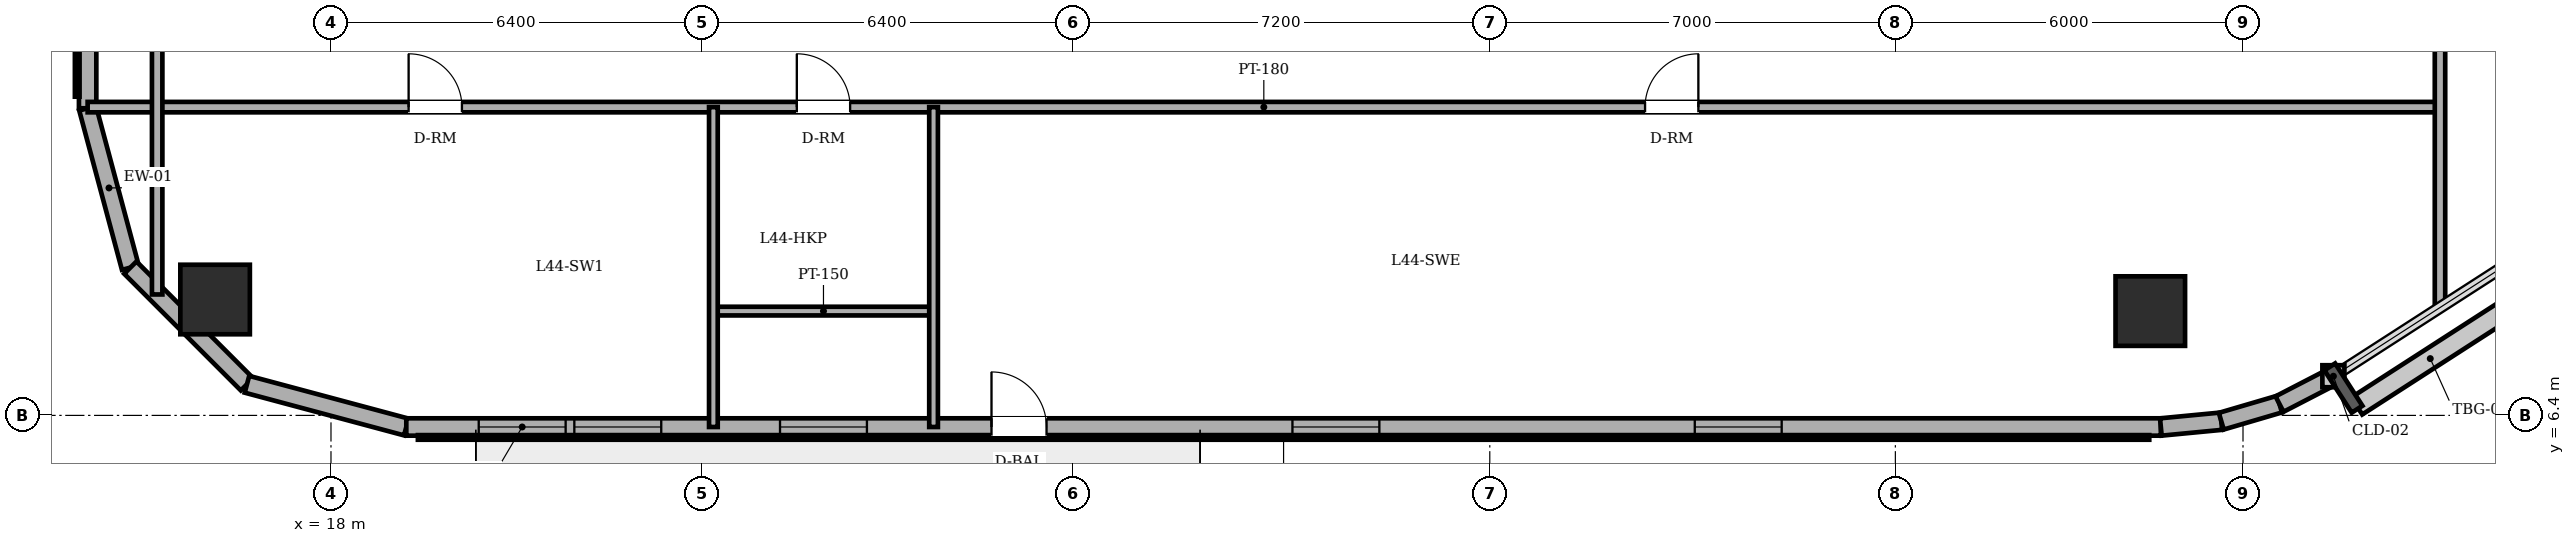
"""IFC4 building model, lengths in metres.
Left out: names, types, materials, properties, quantities, classifications, styles, units other than length and angle.
Written with IfcOpenShell. Run it as: python <this file> out.ifc"""

import sys

from ifc_helpers import new_model, si_unit, direction, frame, frame_2d, origin, origin_2d, place, context, subcontext, project, spatial, rectangle, circle, extrude, element, fill, save


model = new_model("IFC4")
c1 = context("Model", 3, precision=1e-05, world=origin(), true_north=direction((0.0, 1.0)))
c2 = subcontext(c1, "Body", "Model", "MODEL_VIEW")
j1 = project(units=[si_unit("LENGTHUNIT", "METRE"), si_unit("PLANEANGLEUNIT", "RADIAN")], contexts=[c1])
p1 = place(None, origin())
s1 = spatial("IfcSite", under=j1, at=p1, CompositionType="ELEMENT")
p2 = place(p1, origin())
s2 = spatial("IfcBuilding", under=s1, at=p2, CompositionType="ELEMENT")
p3 = place(p2, frame((0.0, 0.0, 169.0)))
s3 = spatial("IfcBuildingStorey", under=s2, at=p3, CompositionType="ELEMENT", Elevation=169.0)
for number, where, z_axis, x_axis in (
    (1, (16.0, 8.4, 0.0), (0.0, 0.0, 1.0), (1.0, 0.0, 0.0)),
    (2, (49.4, 8.2, 0.0), (0.0, 0.0, 1.0), (1.0, 0.0, 0.0)),
):
    element("IfcColumn", number, at=place(p3, frame(where, z_axis=z_axis, x_axis=x_axis)), inside=s3, PredefinedType="COLUMN", context=c2, shape_type="SweptSolid", body=[
        extrude(circle(Radius=0.6, at=origin_2d()), origin(), (0.0, 0.0, 1.0), 3.6),
    ])
p4 = place(p3, frame((13.8, 11.7, 0.0), z_axis=(0.0, 0.0, 1.0), x_axis=(0.258884674387, -0.965908238586, 0.0)))
e3 = element("IfcWall", 3, at=p4, inside=s3, PredefinedType="SOLIDWALL", context=c2, shape_type="SweptSolid", body=[
    extrude(rectangle(XDim=2.847, YDim=0.3, at=frame_2d((1.424, 0.0))), origin(), (0.0, 0.0, 1.0), 3.4),
])
p5 = place(p3, frame((14.537, 8.95, 0.0), z_axis=(0.0, 0.0, 1.0), x_axis=(0.707106781187, -0.707106781187, 0.0)))
e4 = element("IfcWall", 4, at=p5, inside=s3, PredefinedType="SOLIDWALL", context=c2, shape_type="SweptSolid", body=[
    extrude(rectangle(XDim=2.847, YDim=0.3, at=frame_2d((1.423, 0.0))), origin(), (0.0, 0.0, 1.0), 3.4),
])
p6 = place(p3, frame((16.55, 6.937, 0.0), z_axis=(0.0, 0.0, 1.0), x_axis=(0.965908238586, -0.258884674387, 0.0)))
e5 = element("IfcWall", 5, at=p6, inside=s3, PredefinedType="SOLIDWALL", context=c2, shape_type="SweptSolid", body=[
    extrude(rectangle(XDim=2.847, YDim=0.3, at=frame_2d((1.424, 0.0))), origin(), (0.0, 0.0, 1.0), 3.4),
])
p7 = place(p3, frame((19.3, 6.2, 0.0), z_axis=(0.0, 0.0, 1.0), x_axis=(1.0, 0.0, 0.0)))
e6 = element("IfcWall", 6, at=p7, inside=s3, PredefinedType="SOLIDWALL", context=c2, shape_type="SweptSolid", body=[
    extrude(rectangle(XDim=30.282, YDim=0.3, at=frame_2d((15.141, 0.0))), origin(), (0.0, 0.0, 1.0), 3.4),
])
p8 = place(p7, frame((10.1, 0.0, 0.0)))
e7 = element("IfcOpeningElement", 7, at=p8, cuts=e6, PredefinedType="OPENING", context=c2, shape_type="SweptSolid", body=[
    extrude(rectangle(XDim=0.95, YDim=2.2, at=frame_2d((0.475, 1.1))), frame((0.0, 0.16, 0.0), z_axis=(0.0, -1.0, 0.0), x_axis=(1.0, 0.0, 0.0)), (0.0, 0.0, 1.0), 0.32),
])
p9 = place(p7, frame((1.25, 0.0, 0.85)))
e8 = element("IfcOpeningElement", 8, at=p9, cuts=e6, PredefinedType="OPENING", context=c2, shape_type="SweptSolid", body=[
    extrude(rectangle(XDim=1.5, YDim=1.55, at=frame_2d((0.75, 0.775))), frame((0.0, 0.16, 0.0), z_axis=(0.0, -1.0, 0.0), x_axis=(1.0, 0.0, 0.0)), (0.0, 0.0, 1.0), 0.32),
])
p10 = place(p7, frame((2.9, 0.0, 0.85)))
e9 = element("IfcOpeningElement", 9, at=p10, cuts=e6, PredefinedType="OPENING", context=c2, shape_type="SweptSolid", body=[
    extrude(rectangle(XDim=1.5, YDim=1.55, at=frame_2d((0.75, 0.775))), frame((0.0, 0.16, 0.0), z_axis=(0.0, -1.0, 0.0), x_axis=(1.0, 0.0, 0.0)), (0.0, 0.0, 1.0), 0.32),
])
p11 = place(p7, frame((6.45, 0.0, 0.85)))
e10 = element("IfcOpeningElement", 10, at=p11, cuts=e6, PredefinedType="OPENING", context=c2, shape_type="SweptSolid", body=[
    extrude(rectangle(XDim=1.5, YDim=1.55, at=frame_2d((0.75, 0.775))), frame((0.0, 0.16, 0.0), z_axis=(0.0, -1.0, 0.0), x_axis=(1.0, 0.0, 0.0)), (0.0, 0.0, 1.0), 0.32),
])
p12 = place(p7, frame((15.294, 0.0, 0.85)))
e11 = element("IfcOpeningElement", 11, at=p12, cuts=e6, PredefinedType="OPENING", context=c2, shape_type="SweptSolid", body=[
    extrude(rectangle(XDim=1.5, YDim=1.55, at=frame_2d((0.75, 0.775))), frame((0.0, 0.16, 0.0), z_axis=(0.0, -1.0, 0.0), x_axis=(1.0, 0.0, 0.0)), (0.0, 0.0, 1.0), 0.32),
])
p13 = place(p7, frame((22.238, 0.0, 0.85)))
e12 = element("IfcOpeningElement", 12, at=p13, cuts=e6, PredefinedType="OPENING", context=c2, shape_type="SweptSolid", body=[
    extrude(rectangle(XDim=1.5, YDim=1.55, at=frame_2d((0.75, 0.775))), frame((0.0, 0.16, 0.0), z_axis=(0.0, -1.0, 0.0), x_axis=(1.0, 0.0, 0.0)), (0.0, 0.0, 1.0), 0.32),
])
p14 = place(p3, frame((49.582, 6.2, 0.0), z_axis=(0.0, 0.0, 1.0), x_axis=(0.995426089968, 0.095534807324, 0.0)))
e13 = element("IfcWall", 13, at=p14, inside=s3, PredefinedType="SOLIDWALL", context=c2, shape_type="SweptSolid", body=[
    extrude(rectangle(XDim=1.048, YDim=0.3, at=frame_2d((0.524, 0.0))), origin(), (0.0, 0.0, 1.0), 3.4),
])
p15 = place(p3, frame((50.625, 6.3, 0.0), z_axis=(0.0, 0.0, 1.0), x_axis=(0.959528674476, 0.281610942363, 0.0)))
e14 = element("IfcWall", 14, at=p15, inside=s3, PredefinedType="SOLIDWALL", context=c2, shape_type="SweptSolid", body=[
    extrude(rectangle(XDim=1.047, YDim=0.3, at=frame_2d((0.524, 0.0))), origin(), (0.0, 0.0, 1.0), 3.4),
])
p16 = place(p3, frame((51.63, 6.595, 0.0), z_axis=(0.0, 0.0, 1.0), x_axis=(0.888283247196, 0.459296062198, 0.0)))
e15 = element("IfcWall", 15, at=p16, inside=s3, PredefinedType="SOLIDWALL", context=c2, shape_type="SweptSolid", body=[
    extrude(rectangle(XDim=1.047, YDim=0.3, at=frame_2d((0.523, 0.0))), origin(), (0.0, 0.0, 1.0), 3.4),
])
p17 = place(p3, frame((13.8, 36.3, 0.0), z_axis=(0.0, 0.0, 1.0), x_axis=(0.0, -1.0, 0.0)))
e16 = element("IfcWall", 16, at=p17, inside=s3, PredefinedType="SOLIDWALL", context=c2, shape_type="SweptSolid", body=[
    extrude(rectangle(XDim=24.6, YDim=0.3, at=frame_2d((12.3, 0.0))), origin(), (0.0, 0.0, 1.0), 3.4),
])
p18 = place(p17, frame((5.003, 0.0, 0.85)))
e17 = element("IfcOpeningElement", 17, at=p18, cuts=e16, PredefinedType="OPENING", context=c2, shape_type="SweptSolid", body=[
    extrude(rectangle(XDim=1.5, YDim=1.55, at=frame_2d((0.75, 0.775))), frame((0.0, 0.16, 0.0), z_axis=(0.0, -1.0, 0.0), x_axis=(1.0, 0.0, 0.0)), (0.0, 0.0, 1.0), 0.32),
])
p19 = place(p17, frame((8.277, 0.0, 0.85)))
e18 = element("IfcOpeningElement", 18, at=p19, cuts=e16, PredefinedType="OPENING", context=c2, shape_type="SweptSolid", body=[
    extrude(rectangle(XDim=1.5, YDim=1.55, at=frame_2d((0.75, 0.775))), frame((0.0, 0.16, 0.0), z_axis=(0.0, -1.0, 0.0), x_axis=(1.0, 0.0, 0.0)), (0.0, 0.0, 1.0), 0.32),
])
p20 = place(p17, frame((14.823, 0.0, 0.85)))
e19 = element("IfcOpeningElement", 19, at=p20, cuts=e16, PredefinedType="OPENING", context=c2, shape_type="SweptSolid", body=[
    extrude(rectangle(XDim=1.5, YDim=1.55, at=frame_2d((0.75, 0.775))), frame((0.0, 0.16, 0.0), z_axis=(0.0, -1.0, 0.0), x_axis=(1.0, 0.0, 0.0)), (0.0, 0.0, 1.0), 0.32),
])
p21 = place(p17, frame((18.097, 0.0, 0.85)))
e20 = element("IfcOpeningElement", 20, at=p21, cuts=e16, PredefinedType="OPENING", context=c2, shape_type="SweptSolid", body=[
    extrude(rectangle(XDim=1.5, YDim=1.55, at=frame_2d((0.75, 0.775))), frame((0.0, 0.16, 0.0), z_axis=(0.0, -1.0, 0.0), x_axis=(1.0, 0.0, 0.0)), (0.0, 0.0, 1.0), 0.32),
])
p22 = place(p3, frame((24.6, 8.2, 0.0), z_axis=(0.0, 0.0, 1.0), x_axis=(1.0, 0.0, 0.0)))
e21 = element("IfcWall", 21, at=p22, inside=s3, PredefinedType="PARTITIONING", context=c2, shape_type="SweptSolid", body=[
    extrude(rectangle(XDim=3.8, YDim=0.15, at=frame_2d((1.9, 0.0))), origin(), (0.0, 0.0, 1.0), 2.882),
])
p23 = place(p3, frame((13.8, 11.72, 0.0), z_axis=(0.0, 0.0, 1.0), x_axis=(1.0, 0.0, 0.0)))
e22 = element("IfcWall", 22, at=p23, inside=s3, PredefinedType="PARTITIONING", context=c2, shape_type="SweptSolid", body=[
    extrude(rectangle(XDim=40.6, YDim=0.18, at=frame_2d((20.3, 0.0))), origin(), (0.0, 0.0, 1.0), 3.4),
])
p24 = place(p23, frame((12.24, 0.0, 0.0)))
e23 = element("IfcOpeningElement", 23, at=p24, cuts=e22, PredefinedType="OPENING", context=c2, shape_type="SweptSolid", body=[
    extrude(rectangle(XDim=0.92, YDim=2.1, at=frame_2d((0.46, 1.05))), frame((0.0, 0.1, 0.0), z_axis=(0.0, -1.0, 0.0), x_axis=(1.0, 0.0, 0.0)), (0.0, 0.0, 1.0), 0.2),
])
p25 = place(p23, frame((5.54, 0.0, 0.0)))
e24 = element("IfcOpeningElement", 24, at=p25, cuts=e22, PredefinedType="OPENING", context=c2, shape_type="SweptSolid", body=[
    extrude(rectangle(XDim=0.92, YDim=2.1, at=frame_2d((0.46, 1.05))), frame((0.0, 0.1, 0.0), z_axis=(0.0, -1.0, 0.0), x_axis=(1.0, 0.0, 0.0)), (0.0, 0.0, 1.0), 0.2),
])
p26 = place(p23, frame((26.88, 0.0, 0.0)))
e25 = element("IfcOpeningElement", 25, at=p26, cuts=e22, PredefinedType="OPENING", context=c2, shape_type="SweptSolid", body=[
    extrude(rectangle(XDim=0.92, YDim=2.1, at=frame_2d((0.46, 1.05))), frame((0.0, 0.1, 0.0), z_axis=(0.0, -1.0, 0.0), x_axis=(1.0, 0.0, 0.0)), (0.0, 0.0, 1.0), 0.2),
])
p27 = place(p3, frame((15.0, 8.487, 0.0), z_axis=(0.0, 0.0, 1.0), x_axis=(0.0, 1.0, 0.0)))
e26 = element("IfcWall", 26, at=p27, inside=s3, PredefinedType="PARTITIONING", context=c2, shape_type="SweptSolid", body=[
    extrude(rectangle(XDim=5.693, YDim=0.18, at=frame_2d((2.846, 0.0))), origin(), (0.0, 0.0, 1.0), 3.4),
])
for number, where, z_axis, x_axis in (
    (27, (24.6, 6.2, 0.0), (0.0, 0.0, 1.0), (0.0, 1.0, 0.0)),
    (28, (28.4, 6.2, 0.0), (0.0, 0.0, 1.0), (0.0, 1.0, 0.0)),
):
    element("IfcWall", number, at=place(p3, frame(where, z_axis=z_axis, x_axis=x_axis)), inside=s3, PredefinedType="PARTITIONING", context=c2, shape_type="SweptSolid", body=[
        extrude(rectangle(XDim=5.52, YDim=0.15, at=frame_2d((2.76, 0.0))), origin(), (0.0, 0.0, 1.0), 3.4),
    ])
p28 = place(p3, frame((54.4, 8.261, 0.0), z_axis=(0.0, 0.0, 1.0), x_axis=(0.0, 1.0, 0.0)))
e29 = element("IfcWall", 29, at=p28, inside=s3, PredefinedType="PARTITIONING", context=c2, shape_type="SweptSolid", body=[
    extrude(rectangle(XDim=22.089, YDim=0.18, at=frame_2d((11.044, 0.0))), origin(), (0.0, 0.0, 1.0), 3.4),
])
p29 = place(p28, frame((17.694, 0.0, 0.0)))
e30 = element("IfcOpeningElement", 30, at=p29, cuts=e29, PredefinedType="OPENING", context=c2, shape_type="SweptSolid", body=[
    extrude(rectangle(XDim=0.92, YDim=2.1, at=frame_2d((0.46, 1.05))), frame((0.0, 0.1, 0.0), z_axis=(0.0, -1.0, 0.0), x_axis=(1.0, 0.0, 0.0)), (0.0, 0.0, 1.0), 0.2),
])
p30 = place(p28, frame((10.771, 0.0, 0.0)))
e31 = element("IfcOpeningElement", 31, at=p30, cuts=e29, PredefinedType="OPENING", context=c2, shape_type="SweptSolid", body=[
    extrude(rectangle(XDim=0.92, YDim=2.1, at=frame_2d((0.46, 1.05))), frame((0.0, 0.1, 0.0), z_axis=(0.0, -1.0, 0.0), x_axis=(1.0, 0.0, 0.0)), (0.0, 0.0, 1.0), 0.2),
])
p31 = place(p8, origin())
e32 = element("IfcDoor", 32, at=p31, inside=s3, OperationType="SINGLE_SWING_LEFT", PredefinedType="DOOR", context=c2, shape_type="SweptSolid", body=[
    extrude(rectangle(XDim=0.95, YDim=2.2, at=frame_2d((0.475, 1.1))), frame((0.0, 0.025, 0.0), z_axis=(0.0, -1.0, 0.0), x_axis=(1.0, 0.0, 0.0)), (0.0, 0.0, 1.0), 0.05),
])
fill(e7, e32)
p32 = place(p9, origin())
e33 = element("IfcWindow", 33, at=p32, inside=s3, PartitioningType="DOUBLE_PANEL_VERTICAL", PredefinedType="WINDOW", context=c2, shape_type="SweptSolid", body=[
    extrude(rectangle(XDim=1.5, YDim=1.55, at=frame_2d((0.75, 0.775))), frame((0.0, 0.03, 0.0), z_axis=(0.0, -1.0, 0.0), x_axis=(1.0, 0.0, 0.0)), (0.0, 0.0, 1.0), 0.06),
])
fill(e8, e33)
p33 = place(p10, origin())
e34 = element("IfcWindow", 34, at=p33, inside=s3, PartitioningType="DOUBLE_PANEL_VERTICAL", PredefinedType="WINDOW", context=c2, shape_type="SweptSolid", body=[
    extrude(rectangle(XDim=1.5, YDim=1.55, at=frame_2d((0.75, 0.775))), frame((0.0, 0.03, 0.0), z_axis=(0.0, -1.0, 0.0), x_axis=(1.0, 0.0, 0.0)), (0.0, 0.0, 1.0), 0.06),
])
fill(e9, e34)
p34 = place(p11, origin())
e35 = element("IfcWindow", 35, at=p34, inside=s3, PartitioningType="DOUBLE_PANEL_VERTICAL", PredefinedType="WINDOW", context=c2, shape_type="SweptSolid", body=[
    extrude(rectangle(XDim=1.5, YDim=1.55, at=frame_2d((0.75, 0.775))), frame((0.0, 0.03, 0.0), z_axis=(0.0, -1.0, 0.0), x_axis=(1.0, 0.0, 0.0)), (0.0, 0.0, 1.0), 0.06),
])
fill(e10, e35)
p35 = place(p12, origin())
e36 = element("IfcWindow", 36, at=p35, inside=s3, PartitioningType="DOUBLE_PANEL_VERTICAL", PredefinedType="WINDOW", context=c2, shape_type="SweptSolid", body=[
    extrude(rectangle(XDim=1.5, YDim=1.55, at=frame_2d((0.75, 0.775))), frame((0.0, 0.03, 0.0), z_axis=(0.0, -1.0, 0.0), x_axis=(1.0, 0.0, 0.0)), (0.0, 0.0, 1.0), 0.06),
])
fill(e11, e36)
p36 = place(p13, origin())
e37 = element("IfcWindow", 37, at=p36, inside=s3, PartitioningType="DOUBLE_PANEL_VERTICAL", PredefinedType="WINDOW", context=c2, shape_type="SweptSolid", body=[
    extrude(rectangle(XDim=1.5, YDim=1.55, at=frame_2d((0.75, 0.775))), frame((0.0, 0.03, 0.0), z_axis=(0.0, -1.0, 0.0), x_axis=(1.0, 0.0, 0.0)), (0.0, 0.0, 1.0), 0.06),
])
fill(e12, e37)
p37 = place(p24, origin())
e38 = element("IfcDoor", 38, at=p37, inside=s3, OperationType="SINGLE_SWING_LEFT", PredefinedType="DOOR", context=c2, shape_type="SweptSolid", body=[
    extrude(rectangle(XDim=0.92, YDim=2.1, at=frame_2d((0.46, 1.05))), frame((0.0, 0.025, 0.0), z_axis=(0.0, -1.0, 0.0), x_axis=(1.0, 0.0, 0.0)), (0.0, 0.0, 1.0), 0.05),
])
fill(e23, e38)
p38 = place(p25, origin())
e39 = element("IfcDoor", 39, at=p38, inside=s3, OperationType="SINGLE_SWING_LEFT", PredefinedType="DOOR", context=c2, shape_type="SweptSolid", body=[
    extrude(rectangle(XDim=0.92, YDim=2.1, at=frame_2d((0.46, 1.05))), frame((0.0, 0.025, 0.0), z_axis=(0.0, -1.0, 0.0), x_axis=(1.0, 0.0, 0.0)), (0.0, 0.0, 1.0), 0.05),
])
fill(e24, e39)
p39 = place(p26, origin())
e40 = element("IfcDoor", 40, at=p39, inside=s3, OperationType="SINGLE_SWING_RIGHT", PredefinedType="DOOR", context=c2, shape_type="SweptSolid", body=[
    extrude(rectangle(XDim=0.92, YDim=2.1, at=frame_2d((0.46, 1.05))), frame((0.0, 0.025, 0.0), z_axis=(0.0, -1.0, 0.0), x_axis=(1.0, 0.0, 0.0)), (0.0, 0.0, 1.0), 0.05),
])
fill(e25, e40)
save(model, sys.argv[1])
